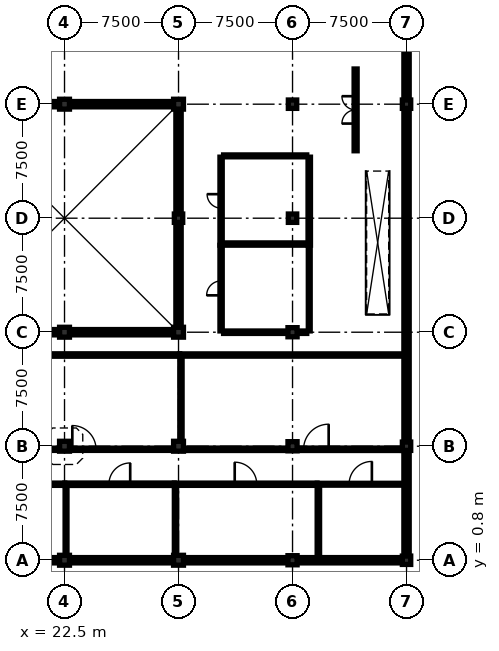
"""IFC4 building model, lengths in metres.
Left out: names, types, materials, properties, quantities, classifications, styles, units other than length and angle.
Written with IfcOpenShell. Run it as: python <this file> out.ifc"""

import sys

from ifc_helpers import new_model, si_unit, direction, frame, frame_2d, origin, origin_2d, place, context, subcontext, project, spatial, rectangle, extrude, element, fill, save


model = new_model("IFC4")
c1 = context("Model", 3, precision=1e-05, world=origin(), true_north=direction((0.0, 1.0)))
c2 = subcontext(c1, "Body", "Model", "MODEL_VIEW")
j1 = project(units=[si_unit("LENGTHUNIT", "METRE"), si_unit("PLANEANGLEUNIT", "RADIAN")], contexts=[c1])
p1 = place(None, origin())
s1 = spatial("IfcSite", under=j1, at=p1, CompositionType="ELEMENT")
p2 = place(p1, origin())
s2 = spatial("IfcBuilding", under=s1, at=p2, CompositionType="ELEMENT")
p3 = place(p2, frame((0.0, 0.0, 9.5)))
s3 = spatial("IfcBuildingStorey", under=s2, at=p3, CompositionType="ELEMENT", Elevation=9.5)
for number, where, z_axis, x_axis in (
    (1, (22.5, 0.8, 0.0), (0.0, 0.0, 1.0), (1.0, 0.0, 0.0)),
    (2, (22.5, 8.3, 0.0), (0.0, 0.0, 1.0), (1.0, 0.0, 0.0)),
    (3, (22.5, 15.8, 0.0), (0.0, 0.0, 1.0), (1.0, 0.0, 0.0)),
    (4, (22.5, 30.8, 0.0), (0.0, 0.0, 1.0), (1.0, 0.0, 0.0)),
    (5, (30.0, 0.8, 0.0), (0.0, 0.0, 1.0), (1.0, 0.0, 0.0)),
    (6, (30.0, 8.3, 0.0), (0.0, 0.0, 1.0), (1.0, 0.0, 0.0)),
    (7, (30.0, 15.8, 0.0), (0.0, 0.0, 1.0), (1.0, 0.0, 0.0)),
):
    element("IfcColumn", number, at=place(p3, frame(where, z_axis=z_axis, x_axis=x_axis)), inside=s3, PredefinedType="COLUMN", context=c2, shape_type="SweptSolid", body=[
        extrude(rectangle(XDim=0.65, YDim=0.65, at=origin_2d()), origin(), (0.0, 0.0, 1.0), 3.7),
    ])
p4 = place(p3, frame((30.0, 23.3, 0.0), z_axis=(0.0, 0.0, 1.0), x_axis=(1.0, 0.0, 0.0)))
e8 = element("IfcColumn", 8, at=p4, inside=s3, PredefinedType="COLUMN", context=c2, shape_type="SweptSolid", body=[
    extrude(rectangle(XDim=0.55, YDim=0.55, at=origin_2d()), origin(), (0.0, 0.0, 1.0), 3.7),
])
p5 = place(p3, frame((30.0, 30.8, 0.0), z_axis=(0.0, 0.0, 1.0), x_axis=(1.0, 0.0, 0.0)))
e9 = element("IfcColumn", 9, at=p5, inside=s3, PredefinedType="COLUMN", context=c2, shape_type="SweptSolid", body=[
    extrude(rectangle(XDim=0.65, YDim=0.65, at=origin_2d()), origin(), (0.0, 0.0, 1.0), 3.7),
])
for number, where, z_axis, x_axis in (
    (10, (37.5, 0.8, 0.0), (0.0, 0.0, 1.0), (1.0, 0.0, 0.0)),
    (11, (37.5, 8.3, 0.0), (0.0, 0.0, 1.0), (1.0, 0.0, 0.0)),
    (12, (37.5, 15.8, 0.0), (0.0, 0.0, 1.0), (1.0, 0.0, 0.0)),
):
    element("IfcColumn", number, at=place(p3, frame(where, z_axis=z_axis, x_axis=x_axis)), inside=s3, PredefinedType="COLUMN", context=c2, shape_type="SweptSolid", body=[
        extrude(rectangle(XDim=0.6, YDim=0.6, at=origin_2d()), origin(), (0.0, 0.0, 1.0), 3.7),
    ])
for number, where, z_axis, x_axis in (
    (13, (37.5, 23.3, 0.0), (0.0, 0.0, 1.0), (1.0, 0.0, 0.0)),
    (14, (37.5, 30.8, 0.0), (0.0, 0.0, 1.0), (1.0, 0.0, 0.0)),
):
    element("IfcColumn", number, at=place(p3, frame(where, z_axis=z_axis, x_axis=x_axis)), inside=s3, PredefinedType="COLUMN", context=c2, shape_type="SweptSolid", body=[
        extrude(rectangle(XDim=0.55, YDim=0.55, at=origin_2d()), origin(), (0.0, 0.0, 1.0), 3.7),
    ])
for number, where, z_axis, x_axis in (
    (15, (45.0, 0.8, 0.0), (0.0, 0.0, 1.0), (1.0, 0.0, 0.0)),
    (16, (45.0, 8.3, 0.0), (0.0, 0.0, 1.0), (1.0, 0.0, 0.0)),
    (17, (45.0, 30.8, 0.0), (0.0, 0.0, 1.0), (1.0, 0.0, 0.0)),
):
    element("IfcColumn", number, at=place(p3, frame(where, z_axis=z_axis, x_axis=x_axis)), inside=s3, PredefinedType="COLUMN", context=c2, shape_type="SweptSolid", body=[
        extrude(rectangle(XDim=0.55, YDim=0.55, at=origin_2d()), origin(), (0.0, 0.0, 1.0), 3.75),
    ])
p6 = place(p3, frame((45.0, 38.025, 0.0), z_axis=(0.0, 0.0, 1.0), x_axis=(0.0, -1.0, 0.0)))
e18 = element("IfcWall", 18, at=p6, inside=s3, PredefinedType="SOLIDWALL", context=c2, shape_type="SweptSolid", body=[
    extrude(rectangle(XDim=6.95, YDim=0.35, at=frame_2d((3.475, 0.0))), origin(), (0.0, 0.0, 1.0), 2.985),
])
p7 = place(p3, frame((45.0, 30.525, 0.0), z_axis=(0.0, 0.0, 1.0), x_axis=(0.0, -1.0, 0.0)))
e19 = element("IfcWall", 19, at=p7, inside=s3, PredefinedType="SOLIDWALL", context=c2, shape_type="SweptSolid", body=[
    extrude(rectangle(XDim=21.95, YDim=0.35, at=frame_2d((10.975, 0.0))), origin(), (0.0, 0.0, 1.0), 2.985),
])
p8 = place(p3, frame((45.0, 8.025, 0.0), z_axis=(0.0, 0.0, 1.0), x_axis=(0.0, -1.0, 0.0)))
e20 = element("IfcWall", 20, at=p8, inside=s3, PredefinedType="SOLIDWALL", context=c2, shape_type="SweptSolid", body=[
    extrude(rectangle(XDim=6.95, YDim=0.35, at=frame_2d((3.475, 0.0))), origin(), (0.0, 0.0, 1.0), 2.985),
])
p9 = place(p3, frame((44.725, 0.8, 0.0), z_axis=(0.0, 0.0, 1.0), x_axis=(-1.0, 0.0, 0.0)))
e21 = element("IfcWall", 21, at=p9, inside=s3, PredefinedType="SOLIDWALL", context=c2, shape_type="SweptSolid", body=[
    extrude(rectangle(XDim=6.925, YDim=0.35, at=frame_2d((3.462, 0.0))), origin(), (0.0, 0.0, 1.0), 2.985),
])
p10 = place(p3, frame((37.2, 0.8, 0.0), z_axis=(0.0, 0.0, 1.0), x_axis=(-1.0, 0.0, 0.0)))
e22 = element("IfcWall", 22, at=p10, inside=s3, PredefinedType="SOLIDWALL", context=c2, shape_type="SweptSolid", body=[
    extrude(rectangle(XDim=6.875, YDim=0.35, at=frame_2d((3.438, 0.0))), origin(), (0.0, 0.0, 1.0), 2.985),
])
for number, where, z_axis, x_axis in (
    (23, (29.675, 0.8, 0.0), (0.0, 0.0, 1.0), (-1.0, 0.0, 0.0)),
    (24, (22.175, 0.8, 0.0), (0.0, 0.0, 1.0), (-1.0, 0.0, 0.0)),
    (25, (15.325, 15.8, 0.0), (0.0, 0.0, 1.0), (1.0, 0.0, 0.0)),
):
    element("IfcWall", number, at=place(p3, frame(where, z_axis=z_axis, x_axis=x_axis)), inside=s3, PredefinedType="SOLIDWALL", context=c2, shape_type="SweptSolid", body=[
        extrude(rectangle(XDim=6.85, YDim=0.35, at=frame_2d((3.425, 0.0))), origin(), (0.0, 0.0, 1.0), 2.785),
    ])
p11 = place(p3, frame((22.825, 15.8, 0.0), z_axis=(0.0, 0.0, 1.0), x_axis=(1.0, 0.0, 0.0)))
e26 = element("IfcWall", 26, at=p11, inside=s3, PredefinedType="SOLIDWALL", context=c2, shape_type="SweptSolid", body=[
    extrude(rectangle(XDim=6.85, YDim=0.35, at=frame_2d((3.425, 0.0))), origin(), (0.0, 0.0, 1.0), 2.785),
])
p12 = place(p11, frame((2.725, 0.0, 0.9)))
e27 = element("IfcOpeningElement", 27, at=p12, cuts=e26, PredefinedType="OPENING", context=c2, shape_type="SweptSolid", body=[
    extrude(rectangle(XDim=1.4, YDim=1.5, at=frame_2d((0.7, 0.75))), frame((0.0, 0.187, 0.0), z_axis=(0.0, -1.0, 0.0), x_axis=(1.0, 0.0, 0.0)), (0.0, 0.0, 1.0), 0.374),
])
p13 = place(p3, frame((30.0, 16.125, 0.0), z_axis=(0.0, 0.0, 1.0), x_axis=(0.0, 1.0, 0.0)))
e28 = element("IfcWall", 28, at=p13, inside=s3, PredefinedType="SOLIDWALL", context=c2, shape_type="SweptSolid", body=[
    extrude(rectangle(XDim=6.9, YDim=0.35, at=frame_2d((3.45, 0.0))), origin(), (0.0, 0.0, 1.0), 2.985),
])
p14 = place(p13, frame((2.75, 0.0, 0.9)))
e29 = element("IfcOpeningElement", 29, at=p14, cuts=e28, PredefinedType="OPENING", context=c2, shape_type="SweptSolid", body=[
    extrude(rectangle(XDim=1.4, YDim=1.7, at=frame_2d((0.7, 0.85))), frame((0.0, 0.187, 0.0), z_axis=(0.0, -1.0, 0.0), x_axis=(1.0, 0.0, 0.0)), (0.0, 0.0, 1.0), 0.374),
])
p15 = place(p3, frame((30.0, 23.575, 0.0), z_axis=(0.0, 0.0, 1.0), x_axis=(0.0, 1.0, 0.0)))
e30 = element("IfcWall", 30, at=p15, inside=s3, PredefinedType="SOLIDWALL", context=c2, shape_type="SweptSolid", body=[
    extrude(rectangle(XDim=6.9, YDim=0.35, at=frame_2d((3.45, 0.0))), origin(), (0.0, 0.0, 1.0), 2.985),
])
for number, where, z_axis, x_axis in (
    (31, (29.675, 30.8, 0.0), (0.0, 0.0, 1.0), (-1.0, 0.0, 0.0)),
    (32, (22.175, 30.8, 0.0), (0.0, 0.0, 1.0), (-1.0, 0.0, 0.0)),
):
    element("IfcWall", number, at=place(p3, frame(where, z_axis=z_axis, x_axis=x_axis)), inside=s3, PredefinedType="SOLIDWALL", context=c2, shape_type="SweptSolid", body=[
        extrude(rectangle(XDim=6.85, YDim=0.35, at=frame_2d((3.425, 0.0))), origin(), (0.0, 0.0, 1.0), 2.785),
    ])
p16 = place(p3, frame((15.485, 5.8, 0.0), z_axis=(0.0, 0.0, 1.0), x_axis=(1.0, 0.0, 0.0)))
e33 = element("IfcWall", 33, at=p16, inside=s3, PredefinedType="PARTITIONING", context=c2, shape_type="SweptSolid", body=[
    extrude(rectangle(XDim=7.03, YDim=0.15, at=frame_2d((3.515, 0.0))), origin(), (0.0, 0.0, 1.0), 2.785),
])
p17 = place(p16, frame((2.845, 0.0, 0.0)))
e34 = element("IfcOpeningElement", 34, at=p17, cuts=e33, PredefinedType="OPENING", context=c2, shape_type="SweptSolid", body=[
    extrude(rectangle(XDim=1.34, YDim=2.24, at=frame_2d((0.67, 1.12))), frame((0.0, 0.087, 0.0), z_axis=(0.0, -1.0, 0.0), x_axis=(1.0, 0.0, 0.0)), (0.0, 0.0, 1.0), 0.174),
])
p18 = place(p3, frame((22.527, 5.8, 0.0), z_axis=(0.0, 0.0, 1.0), x_axis=(1.0, 0.0, 0.0)))
e35 = element("IfcWall", 35, at=p18, inside=s3, PredefinedType="PARTITIONING", context=c2, shape_type="SweptSolid", body=[
    extrude(rectangle(XDim=7.188, YDim=0.16, at=frame_2d((3.594, 0.0))), origin(), (0.0, 0.0, 1.0), 2.785),
])
p19 = place(p18, frame((2.894, 0.0, 0.0)))
e36 = element("IfcOpeningElement", 36, at=p19, cuts=e35, PredefinedType="OPENING", context=c2, shape_type="SweptSolid", body=[
    extrude(rectangle(XDim=1.4, YDim=2.25, at=frame_2d((0.7, 1.125))), frame((0.0, 0.092, 0.0), z_axis=(0.0, -1.0, 0.0), x_axis=(1.0, 0.0, 0.0)), (0.0, 0.0, 1.0), 0.184),
])
p20 = place(p3, frame((29.727, 5.8, 0.0), z_axis=(0.0, 0.0, 1.0), x_axis=(1.0, 0.0, 0.0)))
e37 = element("IfcWall", 37, at=p20, inside=s3, PredefinedType="PARTITIONING", context=c2, shape_type="SweptSolid", body=[
    extrude(rectangle(XDim=9.388, YDim=0.15, at=frame_2d((4.694, 0.0))), origin(), (0.0, 0.0, 1.0), 2.985),
])
p21 = place(p20, frame((3.969, 0.0, 0.0)))
e38 = element("IfcOpeningElement", 38, at=p21, cuts=e37, PredefinedType="OPENING", context=c2, shape_type="SweptSolid", body=[
    extrude(rectangle(XDim=1.45, YDim=2.26, at=frame_2d((0.725, 1.13))), frame((0.0, 0.087, 0.0), z_axis=(0.0, -1.0, 0.0), x_axis=(1.0, 0.0, 0.0)), (0.0, 0.0, 1.0), 0.174),
])
p22 = place(p3, frame((39.127, 5.8, 0.0), z_axis=(0.0, 0.0, 1.0), x_axis=(1.0, 0.0, 0.0)))
e39 = element("IfcWall", 39, at=p22, inside=s3, PredefinedType="PARTITIONING", context=c2, shape_type="SweptSolid", body=[
    extrude(rectangle(XDim=5.686, YDim=0.125, at=frame_2d((2.843, 0.0))), origin(), (0.0, 0.0, 1.0), 3.085),
])
p23 = place(p22, frame((2.093, 0.0, 0.0)))
e40 = element("IfcOpeningElement", 40, at=p23, cuts=e39, PredefinedType="OPENING", context=c2, shape_type="SweptSolid", body=[
    extrude(rectangle(XDim=1.5, YDim=2.28, at=frame_2d((0.75, 1.14))), frame((0.0, 0.074, 0.0), z_axis=(0.0, -1.0, 0.0), x_axis=(1.0, 0.0, 0.0)), (0.0, 0.0, 1.0), 0.149),
])
p24 = place(p3, frame((15.337, 8.1, 0.0), z_axis=(0.0, 0.0, 1.0), x_axis=(1.0, 0.0, 0.0)))
e41 = element("IfcWall", 41, at=p24, inside=s3, PredefinedType="PARTITIONING", context=c2, shape_type="SweptSolid", body=[
    extrude(rectangle(XDim=14.571, YDim=0.15, at=frame_2d((7.286, 0.0))), origin(), (0.0, 0.0, 1.0), 2.785),
])
p25 = place(p24, frame((7.677, 0.0, 0.0)))
e42 = element("IfcOpeningElement", 42, at=p25, cuts=e41, PredefinedType="OPENING", context=c2, shape_type="SweptSolid", body=[
    extrude(rectangle(XDim=1.56, YDim=2.3, at=frame_2d((0.78, 1.15))), frame((0.0, 0.087, 0.0), z_axis=(0.0, -1.0, 0.0), x_axis=(1.0, 0.0, 0.0)), (0.0, 0.0, 1.0), 0.174),
])
p26 = place(p3, frame((30.337, 8.1, 0.0), z_axis=(0.0, 0.0, 1.0), x_axis=(1.0, 0.0, 0.0)))
e43 = element("IfcWall", 43, at=p26, inside=s3, PredefinedType="PARTITIONING", context=c2, shape_type="SweptSolid", body=[
    extrude(rectangle(XDim=14.376, YDim=0.16, at=frame_2d((7.188, 0.0))), origin(), (0.0, 0.0, 1.0), 2.985),
])
p27 = place(p26, frame((7.89, 0.0, 0.0)))
e44 = element("IfcOpeningElement", 44, at=p27, cuts=e43, PredefinedType="OPENING", context=c2, shape_type="SweptSolid", body=[
    extrude(rectangle(XDim=1.65, YDim=2.32, at=frame_2d((0.825, 1.16))), frame((0.0, 0.092, 0.0), z_axis=(0.0, -1.0, 0.0), x_axis=(1.0, 0.0, 0.0)), (0.0, 0.0, 1.0), 0.184),
])
p28 = place(p3, frame((41.65, 27.735, 0.0), z_axis=(0.0, 0.0, 1.0), x_axis=(0.0, 1.0, 0.0)))
e45 = element("IfcWall", 45, at=p28, inside=s3, PredefinedType="PARTITIONING", context=c2, shape_type="SweptSolid", body=[
    extrude(rectangle(XDim=5.38, YDim=0.2, at=frame_2d((2.69, 0.0))), origin(), (0.0, 0.0, 1.0), 2.985),
])
p29 = place(p28, frame((1.79, 0.0, 0.0)))
e46 = element("IfcOpeningElement", 46, at=p29, cuts=e45, PredefinedType="OPENING", context=c2, shape_type="SweptSolid", body=[
    extrude(rectangle(XDim=1.8, YDim=2.15, at=frame_2d((0.9, 1.075))), frame((0.0, 0.112, 0.0), z_axis=(0.0, -1.0, 0.0), x_axis=(1.0, 0.0, 0.0)), (0.0, 0.0, 1.0), 0.224),
])
p30 = place(p3, frame((32.8, 15.885, 0.0), z_axis=(0.0, 0.0, 1.0), x_axis=(0.0, 1.0, 0.0)))
e47 = element("IfcWall", 47, at=p30, inside=s3, PredefinedType="PARTITIONING", context=c2, shape_type="SweptSolid", body=[
    extrude(rectangle(XDim=5.63, YDim=0.15, at=frame_2d((2.815, 0.0))), origin(), (0.0, 0.0, 1.0), 2.985),
])
p31 = place(p30, frame((2.34, 0.0, 0.0)))
e48 = element("IfcOpeningElement", 48, at=p31, cuts=e47, PredefinedType="OPENING", context=c2, shape_type="SweptSolid", body=[
    extrude(rectangle(XDim=0.95, YDim=2.15, at=frame_2d((0.475, 1.075))), frame((0.0, 0.087, 0.0), z_axis=(0.0, -1.0, 0.0), x_axis=(1.0, 0.0, 0.0)), (0.0, 0.0, 1.0), 0.174),
])
p32 = place(p3, frame((32.8, 21.527, 0.0), z_axis=(0.0, 0.0, 1.0), x_axis=(0.0, 1.0, 0.0)))
e49 = element("IfcWall", 49, at=p32, inside=s3, PredefinedType="PARTITIONING", context=c2, shape_type="SweptSolid", body=[
    extrude(rectangle(XDim=5.788, YDim=0.15, at=frame_2d((2.894, 0.0))), origin(), (0.0, 0.0, 1.0), 2.985),
])
p33 = place(p32, frame((2.434, 0.0, 0.0)))
e50 = element("IfcOpeningElement", 50, at=p33, cuts=e49, PredefinedType="OPENING", context=c2, shape_type="SweptSolid", body=[
    extrude(rectangle(XDim=0.92, YDim=2.1, at=frame_2d((0.46, 1.05))), frame((0.0, 0.087, 0.0), z_axis=(0.0, -1.0, 0.0), x_axis=(1.0, 0.0, 0.0)), (0.0, 0.0, 1.0), 0.174),
])
p34 = place(p3, frame((15.485, 14.3, 0.0), z_axis=(0.0, 0.0, 1.0), x_axis=(1.0, 0.0, 0.0)))
e51 = element("IfcWall", 51, at=p34, inside=s3, PredefinedType="PARTITIONING", context=c2, shape_type="SweptSolid", body=[
    extrude(rectangle(XDim=14.59, YDim=0.16, at=frame_2d((7.295, 0.0))), origin(), (0.0, 0.0, 1.0), 2.785),
])
p35 = place(p3, frame((30.087, 14.3, 0.0), z_axis=(0.0, 0.0, 1.0), x_axis=(1.0, 0.0, 0.0)))
e52 = element("IfcWall", 52, at=p35, inside=s3, PredefinedType="PARTITIONING", context=c2, shape_type="SweptSolid", body=[
    extrude(rectangle(XDim=14.726, YDim=0.15, at=frame_2d((7.363, 0.0))), origin(), (0.0, 0.0, 1.0), 2.985),
])
p36 = place(p3, frame((38.6, 15.885, 0.0), z_axis=(0.0, 0.0, 1.0), x_axis=(0.0, 1.0, 0.0)))
e53 = element("IfcWall", 53, at=p36, inside=s3, PredefinedType="PARTITIONING", context=c2, shape_type="SweptSolid", body=[
    extrude(rectangle(XDim=5.63, YDim=0.125, at=frame_2d((2.815, 0.0))), origin(), (0.0, 0.0, 1.0), 3.7),
])
p37 = place(p3, frame((38.6, 21.527, 0.0), z_axis=(0.0, 0.0, 1.0), x_axis=(0.0, 1.0, 0.0)))
e54 = element("IfcWall", 54, at=p37, inside=s3, PredefinedType="PARTITIONING", context=c2, shape_type="SweptSolid", body=[
    extrude(rectangle(XDim=5.788, YDim=0.16, at=frame_2d((2.894, 0.0))), origin(), (0.0, 0.0, 1.0), 3.7),
])
p38 = place(p3, frame((22.6, 1.137, 0.0), z_axis=(0.0, 0.0, 1.0), x_axis=(0.0, 1.0, 0.0)))
e55 = element("IfcWall", 55, at=p38, inside=s3, PredefinedType="PARTITIONING", context=c2, shape_type="SweptSolid", body=[
    extrude(rectangle(XDim=4.571, YDim=0.125, at=frame_2d((2.286, 0.0))), origin(), (0.0, 0.0, 1.0), 2.785),
])
p39 = place(p3, frame((29.8, 1.137, 0.0), z_axis=(0.0, 0.0, 1.0), x_axis=(0.0, 1.0, 0.0)))
e56 = element("IfcWall", 56, at=p39, inside=s3, PredefinedType="PARTITIONING", context=c2, shape_type="SweptSolid", body=[
    extrude(rectangle(XDim=4.576, YDim=0.15, at=frame_2d((2.288, 0.0))), origin(), (0.0, 0.0, 1.0), 2.985),
])
p40 = place(p3, frame((39.2, 0.987, 0.0), z_axis=(0.0, 0.0, 1.0), x_axis=(0.0, 1.0, 0.0)))
e57 = element("IfcWall", 57, at=p40, inside=s3, PredefinedType="PARTITIONING", context=c2, shape_type="SweptSolid", body=[
    extrude(rectangle(XDim=4.739, YDim=0.16, at=frame_2d((2.369, 0.0))), origin(), (0.0, 0.0, 1.0), 3.035),
])
p41 = place(p3, frame((30.16, 8.432, 0.0), z_axis=(0.0, 0.0, 1.0), x_axis=(0.0, 1.0, 0.0)))
e58 = element("IfcWall", 58, at=p41, inside=s3, PredefinedType="PARTITIONING", context=c2, shape_type="SweptSolid", body=[
    extrude(rectangle(XDim=5.781, YDim=0.15, at=frame_2d((2.891, 0.0))), origin(), (0.0, 0.0, 1.0), 2.985),
])
p42 = place(p3, frame((32.965, 15.8, 0.0), z_axis=(0.0, 0.0, 1.0), x_axis=(1.0, 0.0, 0.0)))
e59 = element("IfcWall", 59, at=p42, inside=s3, PredefinedType="PARTITIONING", context=c2, shape_type="SweptSolid", body=[
    extrude(rectangle(XDim=5.47, YDim=0.16, at=frame_2d((2.735, 0.0))), origin(), (0.0, 0.0, 1.0), 2.985),
])
p43 = place(p3, frame((32.887, 21.6, 0.0), z_axis=(0.0, 0.0, 1.0), x_axis=(1.0, 0.0, 0.0)))
e60 = element("IfcWall", 60, at=p43, inside=s3, PredefinedType="PARTITIONING", context=c2, shape_type="SweptSolid", body=[
    extrude(rectangle(XDim=5.621, YDim=0.15, at=frame_2d((2.811, 0.0))), origin(), (0.0, 0.0, 1.0), 2.985),
])
p44 = place(p3, frame((32.965, 27.4, 0.0), z_axis=(0.0, 0.0, 1.0), x_axis=(1.0, 0.0, 0.0)))
e61 = element("IfcWall", 61, at=p44, inside=s3, PredefinedType="PARTITIONING", context=c2, shape_type="SweptSolid", body=[
    extrude(rectangle(XDim=5.47, YDim=0.125, at=frame_2d((2.735, 0.0))), origin(), (0.0, 0.0, 1.0), 2.985),
])
p45 = place(p12, origin())
e62 = element("IfcWindow", 62, at=p45, inside=s3, PartitioningType="SINGLE_PANEL", PredefinedType="WINDOW", context=c2, shape_type="SweptSolid", body=[
    extrude(rectangle(XDim=1.4, YDim=1.5, at=frame_2d((0.7, 0.75))), frame((0.0, 0.03, 0.0), z_axis=(0.0, -1.0, 0.0), x_axis=(1.0, 0.0, 0.0)), (0.0, 0.0, 1.0), 0.06),
])
fill(e27, e62)
p46 = place(p14, origin())
e63 = element("IfcWindow", 63, at=p46, inside=s3, PartitioningType="SINGLE_PANEL", PredefinedType="WINDOW", context=c2, shape_type="SweptSolid", body=[
    extrude(rectangle(XDim=1.4, YDim=1.7, at=frame_2d((0.7, 0.85))), frame((0.0, 0.03, 0.0), z_axis=(0.0, -1.0, 0.0), x_axis=(1.0, 0.0, 0.0)), (0.0, 0.0, 1.0), 0.06),
])
fill(e29, e63)
p47 = place(p19, origin())
e64 = element("IfcDoor", 64, at=p47, inside=s3, OperationType="SINGLE_SWING_RIGHT", PredefinedType="DOOR", context=c2, shape_type="SweptSolid", body=[
    extrude(rectangle(XDim=1.4, YDim=2.25, at=frame_2d((0.7, 1.125))), frame((0.0, 0.025, 0.0), z_axis=(0.0, -1.0, 0.0), x_axis=(1.0, 0.0, 0.0)), (0.0, 0.0, 1.0), 0.05),
])
fill(e36, e64)
p48 = place(p21, origin())
e65 = element("IfcDoor", 65, at=p48, inside=s3, OperationType="SINGLE_SWING_LEFT", PredefinedType="DOOR", context=c2, shape_type="SweptSolid", body=[
    extrude(rectangle(XDim=1.45, YDim=2.26, at=frame_2d((0.725, 1.13))), frame((0.0, 0.025, 0.0), z_axis=(0.0, -1.0, 0.0), x_axis=(1.0, 0.0, 0.0)), (0.0, 0.0, 1.0), 0.05),
])
fill(e38, e65)
p49 = place(p23, origin())
e66 = element("IfcDoor", 66, at=p49, inside=s3, OperationType="SINGLE_SWING_RIGHT", PredefinedType="DOOR", context=c2, shape_type="SweptSolid", body=[
    extrude(rectangle(XDim=1.5, YDim=2.28, at=frame_2d((0.75, 1.14))), frame((0.0, 0.025, 0.0), z_axis=(0.0, -1.0, 0.0), x_axis=(1.0, 0.0, 0.0)), (0.0, 0.0, 1.0), 0.05),
])
fill(e40, e66)
p50 = place(p25, origin())
e67 = element("IfcDoor", 67, at=p50, inside=s3, OperationType="SINGLE_SWING_LEFT", PredefinedType="DOOR", context=c2, shape_type="SweptSolid", body=[
    extrude(rectangle(XDim=1.56, YDim=2.3, at=frame_2d((0.78, 1.15))), frame((0.0, 0.025, 0.0), z_axis=(0.0, -1.0, 0.0), x_axis=(1.0, 0.0, 0.0)), (0.0, 0.0, 1.0), 0.05),
])
fill(e42, e67)
p51 = place(p27, origin())
e68 = element("IfcDoor", 68, at=p51, inside=s3, OperationType="SINGLE_SWING_RIGHT", PredefinedType="DOOR", context=c2, shape_type="SweptSolid", body=[
    extrude(rectangle(XDim=1.65, YDim=2.32, at=frame_2d((0.825, 1.16))), frame((0.0, 0.025, 0.0), z_axis=(0.0, -1.0, 0.0), x_axis=(1.0, 0.0, 0.0)), (0.0, 0.0, 1.0), 0.05),
])
fill(e44, e68)
p52 = place(p29, origin())
e69 = element("IfcDoor", 69, at=p52, inside=s3, OperationType="DOUBLE_DOOR_SINGLE_SWING", PredefinedType="DOOR", context=c2, shape_type="SweptSolid", body=[
    extrude(rectangle(XDim=1.8, YDim=2.15, at=frame_2d((0.9, 1.075))), frame((0.0, 0.025, 0.0), z_axis=(0.0, -1.0, 0.0), x_axis=(1.0, 0.0, 0.0)), (0.0, 0.0, 1.0), 0.05),
])
fill(e46, e69)
p53 = place(p31, origin())
e70 = element("IfcDoor", 70, at=p53, inside=s3, OperationType="SINGLE_SWING_LEFT", PredefinedType="DOOR", context=c2, shape_type="SweptSolid", body=[
    extrude(rectangle(XDim=0.95, YDim=2.15, at=frame_2d((0.475, 1.075))), frame((0.0, 0.025, 0.0), z_axis=(0.0, -1.0, 0.0), x_axis=(1.0, 0.0, 0.0)), (0.0, 0.0, 1.0), 0.05),
])
fill(e48, e70)
p54 = place(p33, origin())
e71 = element("IfcDoor", 71, at=p54, inside=s3, OperationType="SINGLE_SWING_RIGHT", PredefinedType="DOOR", context=c2, shape_type="SweptSolid", body=[
    extrude(rectangle(XDim=0.92, YDim=2.1, at=frame_2d((0.46, 1.05))), frame((0.0, 0.025, 0.0), z_axis=(0.0, -1.0, 0.0), x_axis=(1.0, 0.0, 0.0)), (0.0, 0.0, 1.0), 0.05),
])
fill(e50, e71)
save(model, sys.argv[1])
